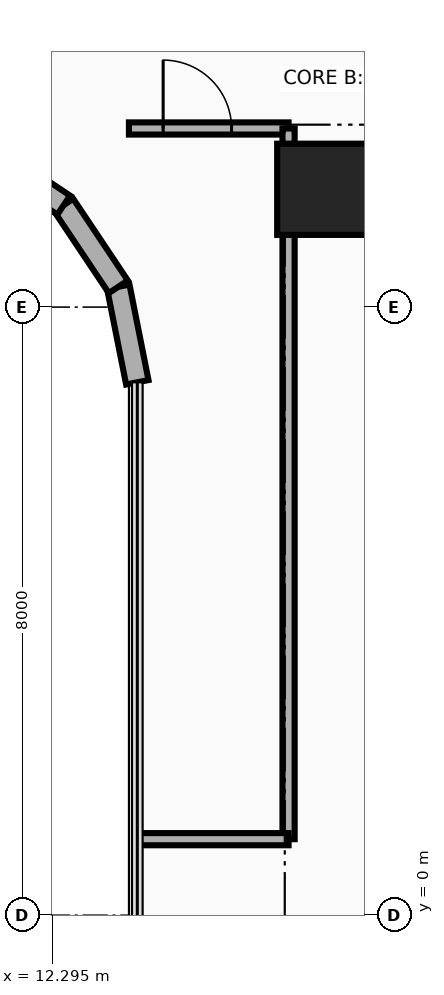
"""IFC4 building model, lengths in metres.
Left out: names, types, materials, properties, quantities, classifications, styles, units other than length and angle.
Written with IfcOpenShell. Run it as: python <this file> out.ifc"""

import sys

from ifc_helpers import new_model, si_unit, direction, frame, frame_2d, origin, origin_2d, place, context, subcontext, project, spatial, rectangle, extrude, source, transform, mapped, element, fill, save


model = new_model("IFC4")
c1 = context("Model", 3, precision=1e-05, world=origin(), true_north=direction((0.0, 1.0)))
c2 = subcontext(c1, "Body", "Model", "MODEL_VIEW")
j1 = project(units=[si_unit("LENGTHUNIT", "METRE"), si_unit("PLANEANGLEUNIT", "RADIAN")], contexts=[c1])
p1 = place(None, origin())
s1 = spatial("IfcSite", under=j1, at=p1, CompositionType="ELEMENT")
p2 = place(p1, origin())
s2 = spatial("IfcBuilding", under=s1, at=p2, CompositionType="ELEMENT")
p3 = place(p2, frame((0.0, 0.0, 113.1)))
s3 = spatial("IfcBuildingStorey", under=s2, at=p3, CompositionType="ELEMENT", Elevation=113.1)
p4 = place(p3, frame((15.85, 9.55, 0.0), z_axis=(0.0, 0.0, 1.0), x_axis=(1.0, 0.0, 0.0)))
e1 = element("IfcWall", 1, at=p4, inside=s3, PredefinedType="SHEAR", context=c2, shape_type="SweptSolid", body=[
    extrude(rectangle(XDim=9.0, YDim=0.7, at=frame_2d((4.5, 0.0))), origin(), (0.0, 0.0, 1.0), 3.46),
])
m1 = source(origin(), c2, "Body", "SweptSolid", [
    extrude(rectangle(XDim=1.2, YDim=1.2, at=origin_2d()), origin(), (0.0, 0.0, 1.0), 3.7),
])
p5 = place(p3, frame((15.85, 9.55, 0.0), z_axis=(0.0, 0.0, 1.0), x_axis=(1.0, 0.0, 0.0)))
e2 = element("IfcColumn", 2, at=p5, inside=s3, PredefinedType="COLUMN", context=c2, shape_type="MappedRepresentation", body=[
    mapped(m1, transform((0.0, 0.0, 0.0), x_axis=(1.0, 0.0, 0.0), y_axis=(0.0, 1.0, 0.0), z_axis=(0.0, 0.0, 1.0), scale=1.0)),
])
p6 = place(p3, frame((13.41, 7.011, 0.0), z_axis=(0.0, 0.0, 1.0), x_axis=(-0.195090163074, 0.980785312019, 0.0)))
e3 = element("IfcWall", 3, at=p6, inside=s3, PredefinedType="SOLIDWALL", context=c2, shape_type="SweptSolid", body=[
    extrude(rectangle(XDim=1.281, YDim=0.3, at=frame_2d((0.641, 0.0))), origin(), (0.0, 0.0, 1.0), 3.46),
])
for number, where, z_axis, x_axis in (
    (4, (13.16, 8.268, 0.0), (0.0, 0.0, 1.0), (-0.556, 0.831, 0.0)),
    (5, (12.442, 9.342, 0.0), (0.0, 0.0, 1.0), (-0.831, 0.556, 0.0)),
):
    element("IfcWall", number, at=place(p3, frame(where, z_axis=z_axis, x_axis=x_axis)), inside=s3, PredefinedType="SOLIDWALL", context=c2, shape_type="SweptSolid", body=[
        extrude(rectangle(XDim=1.292, YDim=0.3, at=frame_2d((0.646, 0.0))), origin(), (0.0, 0.0, 1.0), 3.46),
    ])
p7 = place(p3, frame((13.3, 10.35, 0.0), z_axis=(0.0, 0.0, 1.0), x_axis=(1.0, 0.0, 0.0)))
e6 = element("IfcWall", 6, at=p7, inside=s3, PredefinedType="PARTITIONING", context=c2, shape_type="SweptSolid", body=[
    extrude(rectangle(XDim=2.1, YDim=0.16, at=frame_2d((1.05, 0.0))), origin(), (0.0, 0.0, 1.0), 2.666),
])
p8 = place(p7, frame((0.45, 0.0, 0.0)))
e7 = element("IfcOpeningElement", 7, at=p8, cuts=e6, PredefinedType="OPENING", context=c2, shape_type="SweptSolid", body=[
    extrude(rectangle(XDim=0.9, YDim=2.1, at=frame_2d((0.45, 1.05))), frame((0.0, 0.095, 0.0), z_axis=(0.0, -1.0, 0.0), x_axis=(1.0, 0.0, 0.0)), (0.0, 0.0, 1.0), 0.19),
])
p9 = place(p3, frame((15.4, 1.0, 0.0), z_axis=(0.0, 0.0, 1.0), x_axis=(0.0, 1.0, 0.0)))
e8 = element("IfcWall", 8, at=p9, inside=s3, PredefinedType="PARTITIONING", context=c2, shape_type="SweptSolid", body=[
    extrude(rectangle(XDim=9.35, YDim=0.16, at=frame_2d((4.675, 0.0))), origin(), (0.0, 0.0, 1.0), 2.245),
])
p10 = place(p3, frame((13.41, 1.0, 0.0), z_axis=(0.0, 0.0, 1.0), x_axis=(1.0, 0.0, 0.0)))
e9 = element("IfcWall", 9, at=p10, inside=s3, PredefinedType="PARTITIONING", context=c2, shape_type="SweptSolid", body=[
    extrude(rectangle(XDim=1.99, YDim=0.16, at=frame_2d((0.995, 0.0))), origin(), (0.0, 0.0, 1.0), 2.245),
])
p11 = place(p8, origin())
e10 = element("IfcDoor", 10, at=p11, inside=s3, OperationType="SINGLE_SWING_LEFT", PredefinedType="DOOR", context=c2, shape_type="SweptSolid", body=[
    extrude(rectangle(XDim=0.9, YDim=2.1, at=frame_2d((0.45, 1.05))), frame((0.0, 0.025, 0.0), z_axis=(0.0, -1.0, 0.0), x_axis=(1.0, 0.0, 0.0)), (0.0, 0.0, 1.0), 0.05),
])
fill(e7, e10)
save(model, sys.argv[1])
